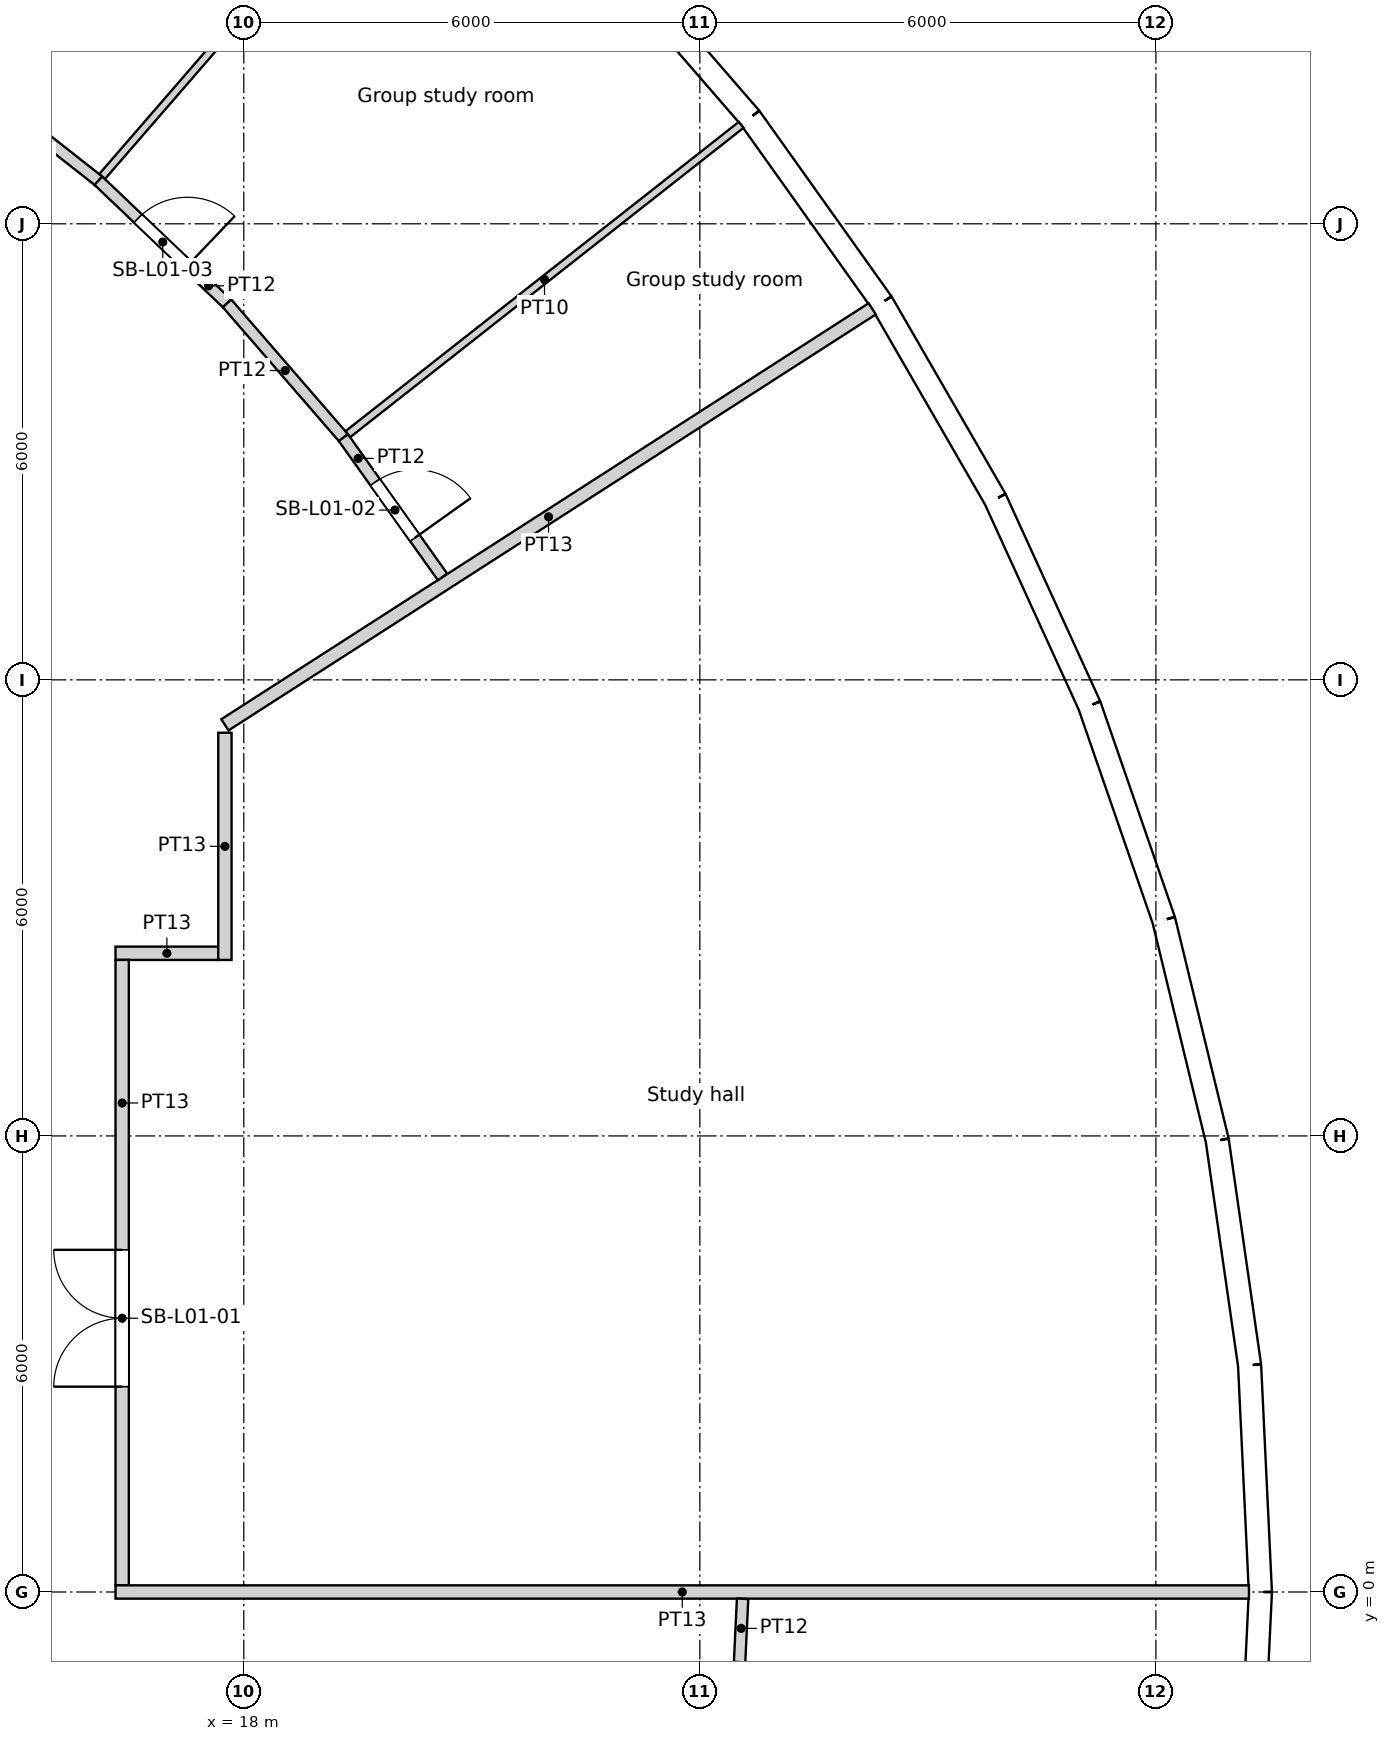
"""IFC4 building model, lengths in metres.
Left out: names, types, materials, properties, quantities, classifications, styles, units other than length and angle.
Written with IfcOpenShell. Run it as: python <this file> out.ifc"""

import sys

from ifc_helpers import new_model, si_unit, direction, frame, frame_2d, origin, origin_2d, place, context, subcontext, project, spatial, rectangle, circle, extrude, element, fill, save


model = new_model("IFC4")
c1 = context("Model", 3, precision=1e-05, world=origin(), true_north=direction((0.0, 1.0)))
c2 = subcontext(c1, "Body", "Model", "MODEL_VIEW")
j1 = project(units=[si_unit("LENGTHUNIT", "METRE"), si_unit("PLANEANGLEUNIT", "RADIAN")], contexts=[c1])
p1 = place(None, origin())
s1 = spatial("IfcSite", under=j1, at=p1, CompositionType="ELEMENT")
p2 = place(p1, origin())
s2 = spatial("IfcBuilding", under=s1, at=p2, CompositionType="ELEMENT")
p3 = place(p2, frame((0.0, 0.0, 9.0)))
s3 = spatial("IfcBuildingStorey", under=s2, at=p3, CompositionType="ELEMENT", Elevation=9.0)
for number, where, z_axis, x_axis in (
    (1, (30.275, 0.0, 0.0), (0.0, 0.0, 1.0), (1.0, 0.0, 0.0)),
    (2, (29.728, 5.729, 0.0), (0.0, 0.0, 1.0), (1.0, 0.0, 0.0)),
    (3, (28.106, 11.252, 0.0), (0.0, 0.0, 1.0), (1.0, 0.0, 0.0)),
    (4, (25.469, 16.368, 0.0), (0.0, 0.0, 1.0), (1.0, 0.0, 0.0)),
    (5, (21.911, 20.892, 0.0), (0.0, 0.0, 1.0), (1.0, 0.0, 0.0)),
):
    element("IfcColumn", number, at=place(p3, frame(where, z_axis=z_axis, x_axis=x_axis)), inside=s3, PredefinedType="COLUMN", context=c2, shape_type="SweptSolid", body=[
        extrude(circle(Radius=0.7, at=origin_2d()), origin(), (0.0, 0.0, 1.0), 4.8),
    ])
for number, where, z_axis, x_axis in (
    (6, (24.548, 0.0, 0.0), (0.0, 0.0, 1.0), (1.0, 0.0, 0.0)),
    (7, (23.886, 5.661, 0.0), (0.0, 0.0, 1.0), (1.0, 0.0, 0.0)),
    (8, (21.937, 11.017, 0.0), (0.0, 0.0, 1.0), (1.0, 0.0, 0.0)),
    (9, (18.805, 15.779, 0.0), (0.0, 0.0, 1.0), (1.0, 0.0, 0.0)),
):
    element("IfcColumn", number, at=place(p3, frame(where, z_axis=z_axis, x_axis=x_axis)), inside=s3, PredefinedType="COLUMN", context=c2, shape_type="SweptSolid", body=[
        extrude(circle(Radius=0.75, at=origin_2d()), origin(), (0.0, 0.0, 1.0), 4.8),
    ])
for number, where, z_axis, x_axis in (
    (10, (18.822, 0.0, 0.0), (0.0, 0.0, 1.0), (1.0, 0.0, 0.0)),
    (11, (17.986, 5.548, 0.0), (0.0, 0.0, 1.0), (1.0, 0.0, 0.0)),
    (12, (15.552, 10.603, 0.0), (0.0, 0.0, 1.0), (1.0, 0.0, 0.0)),
):
    element("IfcColumn", number, at=place(p3, frame(where, z_axis=z_axis, x_axis=x_axis)), inside=s3, PredefinedType="COLUMN", context=c2, shape_type="SweptSolid", body=[
        extrude(circle(Radius=0.8, at=origin_2d()), origin(), (0.0, 0.0, 1.0), 4.8),
    ])
p4 = place(p3, frame((31.375, 0.0, 0.0), z_axis=(0.0, 0.0, 1.0), x_axis=(-0.047588458579, 0.998867027492, 0.0)))
e13 = element("IfcWall", 13, at=p4, inside=s3, PredefinedType="SOLIDWALL", context=c2, shape_type="SweptSolid", body=[
    extrude(rectangle(XDim=2.986, YDim=0.3, at=frame_2d((1.493, 0.0))), origin(), (0.0, 0.0, 1.0), 4.35),
])
p5 = place(p4, frame((1.493, 0.0, 2.0)))
e14 = element("IfcOpeningElement", 14, at=p5, cuts=e13, PredefinedType="OPENING", context=c2, shape_type="SweptSolid", body=[
    extrude(circle(Radius=1.2, at=origin_2d()), frame((0.0, 0.16, 0.0), z_axis=(0.0, -1.0, 0.0), x_axis=(1.0, 0.0, 0.0)), (0.0, 0.0, 1.0), 0.32),
])
p6 = place(p3, frame((31.232, 2.982, 0.0), z_axis=(0.0, 0.0, 1.0), x_axis=(-0.142360001917, 0.989814947278, 0.0)))
e15 = element("IfcWall", 15, at=p6, inside=s3, PredefinedType="SOLIDWALL", context=c2, shape_type="SweptSolid", body=[
    extrude(rectangle(XDim=2.986, YDim=0.3, at=frame_2d((1.493, 0.0))), origin(), (0.0, 0.0, 1.0), 4.35),
])
p7 = place(p6, frame((1.493, 0.0, 2.0)))
e16 = element("IfcOpeningElement", 16, at=p7, cuts=e15, PredefinedType="OPENING", context=c2, shape_type="SweptSolid", body=[
    extrude(circle(Radius=1.2, at=origin_2d()), frame((0.0, 0.16, 0.0), z_axis=(0.0, -1.0, 0.0), x_axis=(1.0, 0.0, 0.0)), (0.0, 0.0, 1.0), 0.32),
])
p8 = place(p3, frame((30.807, 5.938, 0.0), z_axis=(0.0, 0.0, 1.0), x_axis=(-0.235756834479, 0.971812078026, 0.0)))
e17 = element("IfcWall", 17, at=p8, inside=s3, PredefinedType="SOLIDWALL", context=c2, shape_type="SweptSolid", body=[
    extrude(rectangle(XDim=2.986, YDim=0.3, at=frame_2d((1.493, 0.0))), origin(), (0.0, 0.0, 1.0), 4.35),
])
p9 = place(p8, frame((1.493, 0.0, 2.0)))
e18 = element("IfcOpeningElement", 18, at=p9, cuts=e17, PredefinedType="OPENING", context=c2, shape_type="SweptSolid", body=[
    extrude(circle(Radius=1.2, at=origin_2d()), frame((0.0, 0.16, 0.0), z_axis=(0.0, -1.0, 0.0), x_axis=(1.0, 0.0, 0.0)), (0.0, 0.0, 1.0), 0.32),
])
p10 = place(p3, frame((30.104, 8.839, 0.0), z_axis=(0.0, 0.0, 1.0), x_axis=(-0.327074054052, 0.944998710669, 0.0)))
e19 = element("IfcWall", 19, at=p10, inside=s3, PredefinedType="SOLIDWALL", context=c2, shape_type="SweptSolid", body=[
    extrude(rectangle(XDim=2.986, YDim=0.3, at=frame_2d((1.493, 0.0))), origin(), (0.0, 0.0, 1.0), 4.35),
])
p11 = place(p10, frame((1.493, 0.0, 2.0)))
e20 = element("IfcOpeningElement", 20, at=p11, cuts=e19, PredefinedType="OPENING", context=c2, shape_type="SweptSolid", body=[
    extrude(circle(Radius=1.2, at=origin_2d()), frame((0.0, 0.16, 0.0), z_axis=(0.0, -1.0, 0.0), x_axis=(1.0, 0.0, 0.0)), (0.0, 0.0, 1.0), 0.32),
])
p12 = place(p3, frame((29.127, 11.661, 0.0), z_axis=(0.0, 0.0, 1.0), x_axis=(-0.415373250944, 0.909651066289, 0.0)))
e21 = element("IfcWall", 21, at=p12, inside=s3, PredefinedType="SOLIDWALL", context=c2, shape_type="SweptSolid", body=[
    extrude(rectangle(XDim=2.986, YDim=0.3, at=frame_2d((1.493, 0.0))), origin(), (0.0, 0.0, 1.0), 4.35),
])
p13 = place(p12, frame((1.493, 0.0, 2.0)))
e22 = element("IfcOpeningElement", 22, at=p13, cuts=e21, PredefinedType="OPENING", context=c2, shape_type="SweptSolid", body=[
    extrude(circle(Radius=1.2, at=origin_2d()), frame((0.0, 0.16, 0.0), z_axis=(0.0, -1.0, 0.0), x_axis=(1.0, 0.0, 0.0)), (0.0, 0.0, 1.0), 0.32),
])
p14 = place(p3, frame((27.887, 14.377, 0.0), z_axis=(0.0, 0.0, 1.0), x_axis=(-0.500017373705, 0.866015372839, 0.0)))
e23 = element("IfcWall", 23, at=p14, inside=s3, PredefinedType="SOLIDWALL", context=c2, shape_type="SweptSolid", body=[
    extrude(rectangle(XDim=2.986, YDim=0.3, at=frame_2d((1.493, 0.0))), origin(), (0.0, 0.0, 1.0), 4.35),
])
p15 = place(p14, frame((1.493, 0.0, 2.0)))
e24 = element("IfcOpeningElement", 24, at=p15, cuts=e23, PredefinedType="OPENING", context=c2, shape_type="SweptSolid", body=[
    extrude(circle(Radius=1.2, at=origin_2d()), frame((0.0, 0.16, 0.0), z_axis=(0.0, -1.0, 0.0), x_axis=(1.0, 0.0, 0.0)), (0.0, 0.0, 1.0), 0.32),
])
p16 = place(p3, frame((26.394, 16.962, 0.0), z_axis=(0.0, 0.0, 1.0), x_axis=(-0.580100533892, 0.814544885551, 0.0)))
e25 = element("IfcWall", 25, at=p16, inside=s3, PredefinedType="SOLIDWALL", context=c2, shape_type="SweptSolid", body=[
    extrude(rectangle(XDim=2.986, YDim=0.3, at=frame_2d((1.493, 0.0))), origin(), (0.0, 0.0, 1.0), 4.35),
])
p17 = place(p16, frame((1.493, 0.0, 2.0)))
e26 = element("IfcOpeningElement", 26, at=p17, cuts=e25, PredefinedType="OPENING", context=c2, shape_type="SweptSolid", body=[
    extrude(circle(Radius=1.2, at=origin_2d()), frame((0.0, 0.16, 0.0), z_axis=(0.0, -1.0, 0.0), x_axis=(1.0, 0.0, 0.0)), (0.0, 0.0, 1.0), 0.32),
])
p18 = place(p3, frame((24.662, 19.394, 0.0), z_axis=(0.0, 0.0, 1.0), x_axis=(-0.654809121128, 0.755794294029, 0.0)))
e27 = element("IfcWall", 27, at=p18, inside=s3, PredefinedType="SOLIDWALL", context=c2, shape_type="SweptSolid", body=[
    extrude(rectangle(XDim=2.986, YDim=0.3, at=frame_2d((1.493, 0.0))), origin(), (0.0, 0.0, 1.0), 4.35),
])
p19 = place(p18, frame((1.493, 0.0, 2.0)))
e28 = element("IfcOpeningElement", 28, at=p19, cuts=e27, PredefinedType="OPENING", context=c2, shape_type="SweptSolid", body=[
    extrude(circle(Radius=1.2, at=origin_2d()), frame((0.0, 0.16, 0.0), z_axis=(0.0, -1.0, 0.0), x_axis=(1.0, 0.0, 0.0)), (0.0, 0.0, 1.0), 0.32),
])
p20 = place(p3, frame((31.232, -2.982, 0.0), z_axis=(0.0, 0.0, 1.0), x_axis=(0.047588458579, 0.998867027492, 0.0)))
e29 = element("IfcWall", 29, at=p20, inside=s3, PredefinedType="SOLIDWALL", context=c2, shape_type="SweptSolid", body=[
    extrude(rectangle(XDim=2.986, YDim=0.3, at=frame_2d((1.493, 0.0))), origin(), (0.0, 0.0, 1.0), 4.35),
])
p21 = place(p20, frame((1.493, 0.0, 2.0)))
e30 = element("IfcOpeningElement", 30, at=p21, cuts=e29, PredefinedType="OPENING", context=c2, shape_type="SweptSolid", body=[
    extrude(circle(Radius=1.2, at=origin_2d()), frame((0.0, 0.16, 0.0), z_axis=(0.0, -1.0, 0.0), x_axis=(1.0, 0.0, 0.0)), (0.0, 0.0, 1.0), 0.32),
])
p22 = place(p3, frame((16.088, 18.566, 0.0), z_axis=(0.0, 0.0, 1.0), x_axis=(-0.786108126536, 0.618089001191, 0.0)))
e31 = element("IfcWall", 31, at=p22, inside=s3, PredefinedType="PARTITIONING", context=c2, shape_type="SweptSolid", body=[
    extrude(rectangle(XDim=2.338, YDim=0.15, at=frame_2d((1.169, 0.0))), origin(), (0.0, 0.0, 1.0), 3.75),
])
p23 = place(p3, frame((16.4, 8.315, 0.0), z_axis=(0.0, 0.0, 1.0), x_axis=(0.0, -1.0, 0.0)))
e32 = element("IfcWall", 32, at=p23, inside=s3, PredefinedType="PARTITIONING", context=c2, shape_type="SweptSolid", body=[
    extrude(rectangle(XDim=8.228, YDim=0.175, at=frame_2d((4.114, 0.0))), origin(), (0.0, 0.0, 1.0), 3.75),
])
p24 = place(p23, frame((3.814, 0.0, 0.0)))
e33 = element("IfcOpeningElement", 33, at=p24, cuts=e32, PredefinedType="OPENING", context=c2, shape_type="SweptSolid", body=[
    extrude(rectangle(XDim=1.8, YDim=2.4, at=frame_2d((0.9, 1.2))), frame((0.0, 0.087, 0.0), z_axis=(0.0, -1.0, 0.0), x_axis=(1.0, 0.0, 0.0)), (0.0, 0.0, 1.0), 0.175),
])
p25 = place(p3, frame((16.312, 8.403, 0.0), z_axis=(0.0, 0.0, 1.0), x_axis=(1.0, 0.0, 0.0)))
e34 = element("IfcWall", 34, at=p25, inside=s3, PredefinedType="PARTITIONING", context=c2, shape_type="SweptSolid", body=[
    extrude(rectangle(XDim=1.352, YDim=0.175, at=frame_2d((0.676, 0.0))), origin(), (0.0, 0.0, 1.0), 3.75),
])
p26 = place(p3, frame((17.752, 8.315, 0.0), z_axis=(0.0, 0.0, 1.0), x_axis=(0.0, 1.0, 0.0)))
e35 = element("IfcWall", 35, at=p26, inside=s3, PredefinedType="PARTITIONING", context=c2, shape_type="SweptSolid", body=[
    extrude(rectangle(XDim=2.989, YDim=0.175, at=frame_2d((1.494, 0.0))), origin(), (0.0, 0.0, 1.0), 3.75),
])
p27 = place(p3, frame((16.088, 18.566, 0.0), z_axis=(0.0, 0.0, 1.0), x_axis=(0.723668407542, -0.690147836283, 0.0)))
e36 = element("IfcWall", 36, at=p27, inside=s3, PredefinedType="PARTITIONING", context=c2, shape_type="SweptSolid", body=[
    extrude(rectangle(XDim=2.338, YDim=0.15, at=frame_2d((1.169, 0.0))), origin(), (0.0, 0.0, 1.0), 3.75),
])
p28 = place(p27, frame((0.719, 0.0, 0.0)))
e37 = element("IfcOpeningElement", 37, at=p28, cuts=e36, PredefinedType="OPENING", context=c2, shape_type="SweptSolid", body=[
    extrude(rectangle(XDim=0.9, YDim=2.1, at=frame_2d((0.45, 1.05))), frame((0.0, 0.075, 0.0), z_axis=(0.0, -1.0, 0.0), x_axis=(1.0, 0.0, 0.0)), (0.0, 0.0, 1.0), 0.15),
])
p29 = place(p3, frame((19.311, 15.186, 0.0), z_axis=(0.0, 0.0, 1.0), x_axis=(-0.654866925236, 0.755744209526, 0.0)))
e38 = element("IfcWall", 38, at=p29, inside=s3, PredefinedType="PARTITIONING", context=c2, shape_type="SweptSolid", body=[
    extrude(rectangle(XDim=2.338, YDim=0.15, at=frame_2d((1.169, 0.0))), origin(), (0.0, 0.0, 1.0), 3.75),
])
p30 = place(p3, frame((20.448, 23.598, 0.0), z_axis=(0.0, 0.0, 1.0), x_axis=(-0.654862756926, -0.755747821427, 0.0)))
e39 = element("IfcWall", 39, at=p30, inside=s3, PredefinedType="PARTITIONING", context=c2, shape_type="SweptSolid", body=[
    extrude(rectangle(XDim=6.582, YDim=0.1, at=frame_2d((3.291, 0.0))), origin(), (0.0, 0.0, 1.0), 3.75),
])
p31 = place(p3, frame((19.311, 15.186, 0.0), z_axis=(0.0, 0.0, 1.0), x_axis=(0.580046101142, -0.81458364859, 0.0)))
e40 = element("IfcWall", 40, at=p31, inside=s3, PredefinedType="PARTITIONING", context=c2, shape_type="SweptSolid", body=[
    extrude(rectangle(XDim=2.249, YDim=0.15, at=frame_2d((1.124, 0.0))), origin(), (0.0, 0.0, 1.0), 3.75),
])
p32 = place(p31, frame((0.719, 0.0, 0.0)))
e41 = element("IfcOpeningElement", 41, at=p32, cuts=e40, PredefinedType="OPENING", context=c2, shape_type="SweptSolid", body=[
    extrude(rectangle(XDim=0.9, YDim=2.1, at=frame_2d((0.45, 1.05))), frame((0.0, 0.075, 0.0), z_axis=(0.0, -1.0, 0.0), x_axis=(1.0, 0.0, 0.0)), (0.0, 0.0, 1.0), 0.15),
])
p33 = place(p3, frame((24.562, -0.089, 0.0), z_axis=(0.0, 0.0, 1.0), x_axis=(-0.047559990425, -0.998868383377, 0.0)))
e42 = element("IfcWall", 42, at=p33, inside=s3, PredefinedType="PARTITIONING", context=c2, shape_type="SweptSolid", body=[
    extrude(rectangle(XDim=2.248, YDim=0.15, at=frame_2d((1.124, 0.0))), origin(), (0.0, 0.0, 1.0), 3.75),
])
p34 = place(p33, frame((0.83, 0.0, 0.0)))
e43 = element("IfcOpeningElement", 43, at=p34, cuts=e42, PredefinedType="OPENING", context=c2, shape_type="SweptSolid", body=[
    extrude(rectangle(XDim=0.9, YDim=2.1, at=frame_2d((0.45, 1.05))), frame((0.0, 0.075, 0.0), z_axis=(0.0, -1.0, 0.0), x_axis=(1.0, 0.0, 0.0)), (0.0, 0.0, 1.0), 0.15),
])
p35 = place(p3, frame((24.544, 19.302, 0.0), z_axis=(0.0, 0.0, 1.0), x_axis=(-0.786055722677, -0.618155644515, 0.0)))
e44 = element("IfcWall", 44, at=p35, inside=s3, PredefinedType="PARTITIONING", context=c2, shape_type="SweptSolid", body=[
    extrude(rectangle(XDim=6.583, YDim=0.1, at=frame_2d((3.291, 0.0))), origin(), (0.0, 0.0, 1.0), 3.75),
])
p36 = place(p3, frame((26.268, 16.881, 0.0), z_axis=(0.0, 0.0, 1.0), x_axis=(-0.841249776377, -0.540646662568, 0.0)))
e45 = element("IfcWall", 45, at=p36, inside=s3, PredefinedType="PARTITIONING", context=c2, shape_type="SweptSolid", body=[
    extrude(rectangle(XDim=10.123, YDim=0.175, at=frame_2d((5.062, 0.0))), origin(), (0.0, 0.0, 1.0), 3.75),
])
p37 = place(p3, frame((31.224, 0.0, 0.0), z_axis=(0.0, 0.0, 1.0), x_axis=(-1.0, 0.0, 0.0)))
e46 = element("IfcWall", 46, at=p37, inside=s3, PredefinedType="PARTITIONING", context=c2, shape_type="SweptSolid", body=[
    extrude(rectangle(XDim=14.912, YDim=0.175, at=frame_2d((7.456, 0.0))), origin(), (0.0, 0.0, 1.0), 3.75),
])
p38 = place(p5, origin())
e47 = element("IfcWindow", 47, at=p38, inside=s3, PartitioningType="SINGLE_PANEL", PredefinedType="WINDOW", context=c2, shape_type="SweptSolid", body=[
    extrude(circle(Radius=1.2, at=origin_2d()), frame((0.0, 0.12, 0.0), z_axis=(0.0, -1.0, 0.0), x_axis=(1.0, 0.0, 0.0)), (0.0, 0.0, 1.0), 0.1),
])
fill(e14, e47)
p39 = place(p7, origin())
e48 = element("IfcWindow", 48, at=p39, inside=s3, PartitioningType="SINGLE_PANEL", PredefinedType="WINDOW", context=c2, shape_type="SweptSolid", body=[
    extrude(circle(Radius=1.2, at=origin_2d()), frame((0.0, 0.12, 0.0), z_axis=(0.0, -1.0, 0.0), x_axis=(1.0, 0.0, 0.0)), (0.0, 0.0, 1.0), 0.1),
])
fill(e16, e48)
p40 = place(p9, origin())
e49 = element("IfcWindow", 49, at=p40, inside=s3, PartitioningType="SINGLE_PANEL", PredefinedType="WINDOW", context=c2, shape_type="SweptSolid", body=[
    extrude(circle(Radius=1.2, at=origin_2d()), frame((0.0, 0.12, 0.0), z_axis=(0.0, -1.0, 0.0), x_axis=(1.0, 0.0, 0.0)), (0.0, 0.0, 1.0), 0.1),
])
fill(e18, e49)
p41 = place(p11, origin())
e50 = element("IfcWindow", 50, at=p41, inside=s3, PartitioningType="SINGLE_PANEL", PredefinedType="WINDOW", context=c2, shape_type="SweptSolid", body=[
    extrude(circle(Radius=1.2, at=origin_2d()), frame((0.0, 0.12, 0.0), z_axis=(0.0, -1.0, 0.0), x_axis=(1.0, 0.0, 0.0)), (0.0, 0.0, 1.0), 0.1),
])
fill(e20, e50)
p42 = place(p13, origin())
e51 = element("IfcWindow", 51, at=p42, inside=s3, PartitioningType="SINGLE_PANEL", PredefinedType="WINDOW", context=c2, shape_type="SweptSolid", body=[
    extrude(circle(Radius=1.2, at=origin_2d()), frame((0.0, 0.12, 0.0), z_axis=(0.0, -1.0, 0.0), x_axis=(1.0, 0.0, 0.0)), (0.0, 0.0, 1.0), 0.1),
])
fill(e22, e51)
p43 = place(p15, origin())
e52 = element("IfcWindow", 52, at=p43, inside=s3, PartitioningType="SINGLE_PANEL", PredefinedType="WINDOW", context=c2, shape_type="SweptSolid", body=[
    extrude(circle(Radius=1.2, at=origin_2d()), frame((0.0, 0.12, 0.0), z_axis=(0.0, -1.0, 0.0), x_axis=(1.0, 0.0, 0.0)), (0.0, 0.0, 1.0), 0.1),
])
fill(e24, e52)
p44 = place(p17, origin())
e53 = element("IfcWindow", 53, at=p44, inside=s3, PartitioningType="SINGLE_PANEL", PredefinedType="WINDOW", context=c2, shape_type="SweptSolid", body=[
    extrude(circle(Radius=1.2, at=origin_2d()), frame((0.0, 0.12, 0.0), z_axis=(0.0, -1.0, 0.0), x_axis=(1.0, 0.0, 0.0)), (0.0, 0.0, 1.0), 0.1),
])
fill(e26, e53)
p45 = place(p19, origin())
e54 = element("IfcWindow", 54, at=p45, inside=s3, PartitioningType="SINGLE_PANEL", PredefinedType="WINDOW", context=c2, shape_type="SweptSolid", body=[
    extrude(circle(Radius=1.2, at=origin_2d()), frame((0.0, 0.12, 0.0), z_axis=(0.0, -1.0, 0.0), x_axis=(1.0, 0.0, 0.0)), (0.0, 0.0, 1.0), 0.1),
])
fill(e28, e54)
p46 = place(p21, origin())
e55 = element("IfcWindow", 55, at=p46, inside=s3, PartitioningType="SINGLE_PANEL", PredefinedType="WINDOW", context=c2, shape_type="SweptSolid", body=[
    extrude(circle(Radius=1.2, at=origin_2d()), frame((0.0, 0.12, 0.0), z_axis=(0.0, -1.0, 0.0), x_axis=(1.0, 0.0, 0.0)), (0.0, 0.0, 1.0), 0.1),
])
fill(e30, e55)
p47 = place(p24, origin())
e56 = element("IfcDoor", 56, at=p47, inside=s3, OperationType="DOUBLE_DOOR_SINGLE_SWING", PredefinedType="DOOR", context=c2, shape_type="SweptSolid", body=[
    extrude(rectangle(XDim=1.8, YDim=2.4, at=frame_2d((0.9, 1.2))), frame((0.0, 0.025, 0.0), z_axis=(0.0, -1.0, 0.0), x_axis=(1.0, 0.0, 0.0)), (0.0, 0.0, 1.0), 0.05),
])
fill(e33, e56)
p48 = place(p32, origin())
e57 = element("IfcDoor", 57, at=p48, inside=s3, OperationType="SINGLE_SWING_RIGHT", PredefinedType="DOOR", context=c2, shape_type="SweptSolid", body=[
    extrude(rectangle(XDim=0.9, YDim=2.1, at=frame_2d((0.45, 1.05))), frame((0.0, 0.025, 0.0), z_axis=(0.0, -1.0, 0.0), x_axis=(1.0, 0.0, 0.0)), (0.0, 0.0, 1.0), 0.05),
])
fill(e41, e57)
p49 = place(p28, origin())
e58 = element("IfcDoor", 58, at=p49, inside=s3, OperationType="SINGLE_SWING_RIGHT", PredefinedType="DOOR", context=c2, shape_type="SweptSolid", body=[
    extrude(rectangle(XDim=0.9, YDim=2.1, at=frame_2d((0.45, 1.05))), frame((0.0, 0.025, 0.0), z_axis=(0.0, -1.0, 0.0), x_axis=(1.0, 0.0, 0.0)), (0.0, 0.0, 1.0), 0.05),
])
fill(e37, e58)
save(model, sys.argv[1])
